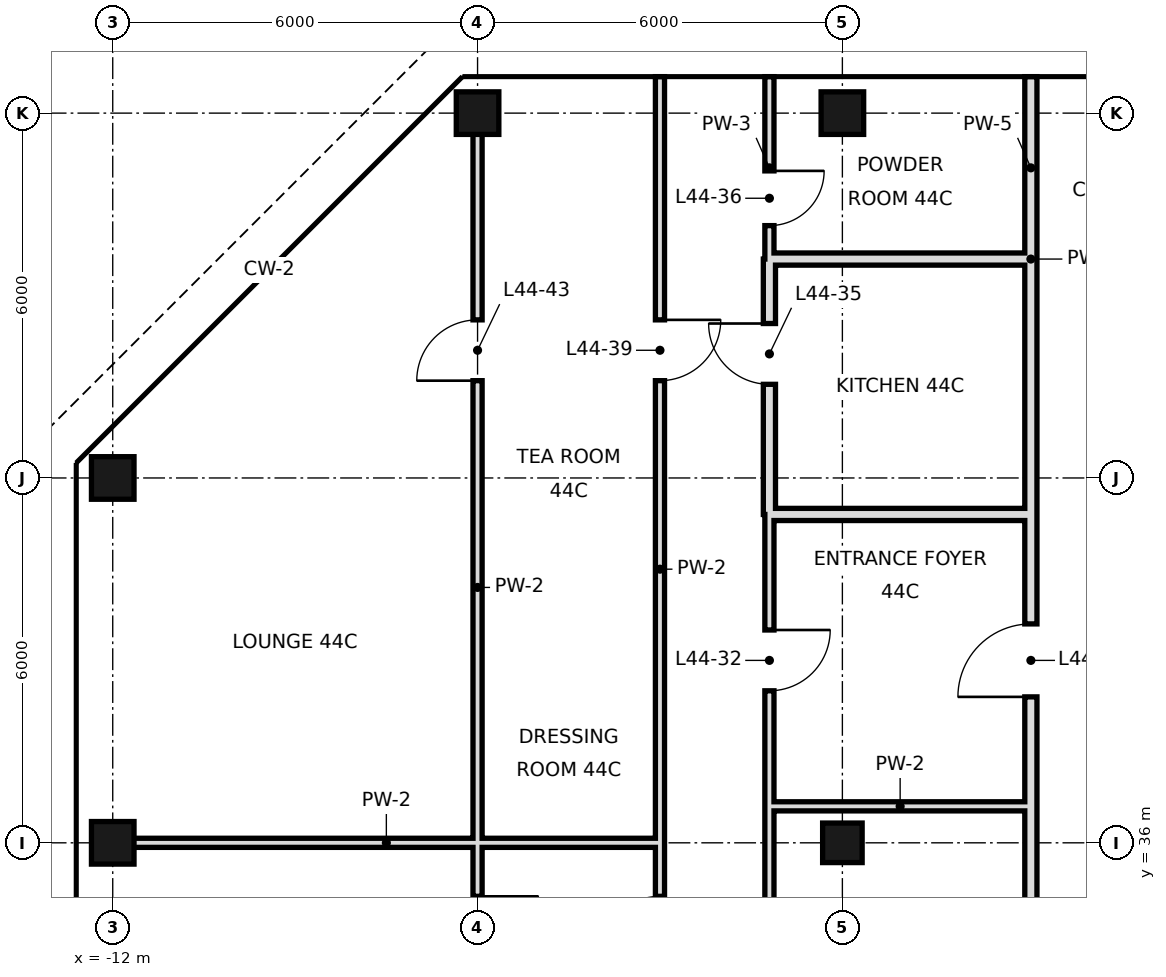
"""IFC4 building model, lengths in metres.
Left out: names, types, materials, properties, quantities, classifications, styles, units other than length and angle.
Written with IfcOpenShell. Run it as: python <this file> out.ifc"""

import sys

from ifc_helpers import new_model, si_unit, direction, frame, frame_2d, origin, origin_2d, place, context, subcontext, project, spatial, rectangle, hollow_rectangle, extrude, element, fill, save


model = new_model("IFC4")
c1 = context("Model", 3, precision=1e-05, world=origin(), true_north=direction((0.0, 1.0)))
c2 = subcontext(c1, "Body", "Model", "MODEL_VIEW")
j1 = project(units=[si_unit("LENGTHUNIT", "METRE"), si_unit("PLANEANGLEUNIT", "RADIAN")], contexts=[c1])
p1 = place(None, origin())
s1 = spatial("IfcSite", under=j1, at=p1, CompositionType="ELEMENT")
p2 = place(p1, origin())
s2 = spatial("IfcBuilding", under=s1, at=p2, CompositionType="ELEMENT")
p3 = place(p2, frame((0.0, 0.0, 192.0)))
s3 = spatial("IfcBuildingStorey", under=s2, at=p3, CompositionType="ELEMENT", Elevation=192.0)
for number, where, z_axis, x_axis in (
    (1, (-12.0, 36.0, -0.3), (0.0, 0.0, 1.0), (1.0, 0.0, 0.0)),
    (2, (-12.0, 42.0, -0.3), (0.0, 0.0, 1.0), (1.0, 0.0, 0.0)),
    (3, (-6.0, 48.0, -0.3), (0.0, 0.0, 1.0), (1.0, 0.0, 0.0)),
):
    element("IfcColumn", number, at=place(p3, frame(where, z_axis=z_axis, x_axis=x_axis)), inside=s3, PredefinedType="COLUMN", context=c2, shape_type="SweptSolid", body=[
        extrude(hollow_rectangle(XDim=0.7, YDim=0.7, WallThickness=0.036, at=origin_2d()), origin(), (0.0, 0.0, 1.0), 3.9),
    ])
p4 = place(p3, frame((0.0, 36.0, 0.0), z_axis=(0.0, 0.0, 1.0), x_axis=(1.0, 0.0, 0.0)))
e4 = element("IfcColumn", 4, at=p4, inside=s3, PredefinedType="COLUMN", context=c2, shape_type="SweptSolid", body=[
    extrude(hollow_rectangle(XDim=0.65, YDim=0.65, WallThickness=0.032, at=origin_2d()), origin(), (0.0, 0.0, 1.0), 3.6),
])
p5 = place(p3, frame((0.0, 48.0, 0.0), z_axis=(0.0, 0.0, 1.0), x_axis=(1.0, 0.0, 0.0)))
e5 = element("IfcColumn", 5, at=p5, inside=s3, PredefinedType="COLUMN", context=c2, shape_type="SweptSolid", body=[
    extrude(hollow_rectangle(XDim=0.7, YDim=0.7, WallThickness=0.036, at=origin_2d()), origin(), (0.0, 0.0, 1.0), 3.6),
])
p6 = place(p3, frame((-1.2, 41.4, 0.0), z_axis=(0.0, 0.0, 1.0), x_axis=(0.0, 1.0, 0.0)))
e6 = element("IfcWall", 6, at=p6, inside=s3, PredefinedType="SOLIDWALL", context=c2, shape_type="SweptSolid", body=[
    extrude(rectangle(XDim=4.2, YDim=0.2, at=frame_2d((2.1, 0.0))), origin(), (0.0, 0.0, 1.0), 2.72),
])
p7 = place(p6, frame((2.14, 0.0, 0.0)))
e7 = element("IfcOpeningElement", 7, at=p7, cuts=e6, PredefinedType="OPENING", context=c2, shape_type="SweptSolid", body=[
    extrude(rectangle(XDim=1.0, YDim=2.4, at=frame_2d((0.5, 1.2))), frame((0.0, 0.11, 0.0), z_axis=(0.0, -1.0, 0.0), x_axis=(1.0, 0.0, 0.0)), (0.0, 0.0, 1.0), 0.22),
])
p8 = place(p3, frame((-1.2, 18.0, 0.0), z_axis=(0.0, 0.0, 1.0), x_axis=(0.0, 1.0, 0.0)))
e8 = element("IfcWall", 8, at=p8, inside=s3, PredefinedType="PARTITIONING", context=c2, shape_type="SweptSolid", body=[
    extrude(rectangle(XDim=23.4, YDim=0.15, at=frame_2d((11.7, 0.0))), origin(), (0.0, 0.0, 1.0), 3.42),
])
p9 = place(p8, frame((20.5, 0.0, 0.0)))
e9 = element("IfcOpeningElement", 9, at=p9, cuts=e8, PredefinedType="OPENING", context=c2, shape_type="SweptSolid", body=[
    extrude(rectangle(XDim=1.0, YDim=2.4, at=frame_2d((0.5, 1.2))), frame((0.0, 0.085, 0.0), z_axis=(0.0, -1.0, 0.0), x_axis=(1.0, 0.0, 0.0)), (0.0, 0.0, 1.0), 0.17),
])
p10 = place(p8, frame((4.3, 0.0, 0.0)))
e10 = element("IfcOpeningElement", 10, at=p10, cuts=e8, PredefinedType="OPENING", context=c2, shape_type="SweptSolid", body=[
    extrude(rectangle(XDim=1.0, YDim=2.4, at=frame_2d((0.5, 1.2))), frame((0.0, 0.085, 0.0), z_axis=(0.0, -1.0, 0.0), x_axis=(1.0, 0.0, 0.0)), (0.0, 0.0, 1.0), 0.17),
])
p11 = place(p8, frame((15.1, 0.0, 0.0)))
e11 = element("IfcOpeningElement", 11, at=p11, cuts=e8, PredefinedType="OPENING", context=c2, shape_type="SweptSolid", body=[
    extrude(rectangle(XDim=1.0, YDim=2.4, at=frame_2d((0.5, 1.2))), frame((0.0, 0.085, 0.0), z_axis=(0.0, -1.0, 0.0), x_axis=(1.0, 0.0, 0.0)), (0.0, 0.0, 1.0), 0.17),
])
p12 = place(p3, frame((-1.2, 45.6, 0.0), z_axis=(0.0, 0.0, 1.0), x_axis=(0.0, 1.0, 0.0)))
e12 = element("IfcWall", 12, at=p12, inside=s3, PredefinedType="PARTITIONING", context=c2, shape_type="SweptSolid", body=[
    extrude(rectangle(XDim=3.0, YDim=0.15, at=frame_2d((1.5, 0.0))), origin(), (0.0, 0.0, 1.0), 3.42),
])
p13 = place(p12, frame((0.55, 0.0, 0.0)))
e13 = element("IfcOpeningElement", 13, at=p13, cuts=e12, PredefinedType="OPENING", context=c2, shape_type="SweptSolid", body=[
    extrude(rectangle(XDim=0.9, YDim=2.4, at=frame_2d((0.45, 1.2))), frame((0.0, 0.085, 0.0), z_axis=(0.0, -1.0, 0.0), x_axis=(1.0, 0.0, 0.0)), (0.0, 0.0, 1.0), 0.17),
])
p14 = place(p3, frame((-3.0, 32.4, 0.0), z_axis=(0.0, 0.0, 1.0), x_axis=(0.0, 1.0, 0.0)))
e14 = element("IfcWall", 14, at=p14, inside=s3, PredefinedType="PARTITIONING", context=c2, shape_type="SweptSolid", body=[
    extrude(rectangle(XDim=16.2, YDim=0.15, at=frame_2d((8.1, 0.0))), origin(), (0.0, 0.0, 1.0), 3.42),
])
p15 = place(p14, frame((1.72, 0.0, 0.0)))
e15 = element("IfcOpeningElement", 15, at=p15, cuts=e14, PredefinedType="OPENING", context=c2, shape_type="SweptSolid", body=[
    extrude(rectangle(XDim=1.0, YDim=2.4, at=frame_2d((0.5, 1.2))), frame((0.0, 0.085, 0.0), z_axis=(0.0, -1.0, 0.0), x_axis=(1.0, 0.0, 0.0)), (0.0, 0.0, 1.0), 0.17),
])
p16 = place(p14, frame((11.2, 0.0, 0.0)))
e16 = element("IfcOpeningElement", 16, at=p16, cuts=e14, PredefinedType="OPENING", context=c2, shape_type="SweptSolid", body=[
    extrude(rectangle(XDim=1.0, YDim=2.4, at=frame_2d((0.5, 1.2))), frame((0.0, 0.085, 0.0), z_axis=(0.0, -1.0, 0.0), x_axis=(1.0, 0.0, 0.0)), (0.0, 0.0, 1.0), 0.17),
])
p17 = place(p3, frame((-6.0, 32.4, 0.0), z_axis=(0.0, 0.0, 1.0), x_axis=(0.0, 1.0, 0.0)))
e17 = element("IfcWall", 17, at=p17, inside=s3, PredefinedType="PARTITIONING", context=c2, shape_type="SweptSolid", body=[
    extrude(rectangle(XDim=15.6, YDim=0.15, at=frame_2d((7.8, 0.0))), origin(), (0.0, 0.0, 1.0), 3.42),
])
p18 = place(p17, frame((1.72, 0.0, 0.0)))
e18 = element("IfcOpeningElement", 18, at=p18, cuts=e17, PredefinedType="OPENING", context=c2, shape_type="SweptSolid", body=[
    extrude(rectangle(XDim=1.0, YDim=2.4, at=frame_2d((0.5, 1.2))), frame((0.0, 0.085, 0.0), z_axis=(0.0, -1.0, 0.0), x_axis=(1.0, 0.0, 0.0)), (0.0, 0.0, 1.0), 0.17),
])
p19 = place(p17, frame((11.2, 0.0, 0.0)))
e19 = element("IfcOpeningElement", 19, at=p19, cuts=e17, PredefinedType="OPENING", context=c2, shape_type="SweptSolid", body=[
    extrude(rectangle(XDim=1.0, YDim=2.4, at=frame_2d((0.5, 1.2))), frame((0.0, 0.085, 0.0), z_axis=(0.0, -1.0, 0.0), x_axis=(1.0, 0.0, 0.0)), (0.0, 0.0, 1.0), 0.17),
])
p20 = place(p3, frame((3.1, 18.0, 0.0), z_axis=(0.0, 0.0, 1.0), x_axis=(0.0, 1.0, 0.0)))
e20 = element("IfcWall", 20, at=p20, inside=s3, PredefinedType="SOLIDWALL", context=c2, shape_type="SweptSolid", body=[
    extrude(rectangle(XDim=23.4, YDim=0.2, at=frame_2d((11.7, 0.0))), origin(), (0.0, 0.0, 1.0), 2.97),
])
p21 = place(p20, frame((20.4, 0.0, 0.0)))
e21 = element("IfcOpeningElement", 21, at=p21, cuts=e20, PredefinedType="OPENING", context=c2, shape_type="SweptSolid", body=[
    extrude(rectangle(XDim=1.2, YDim=2.4, at=frame_2d((0.6, 1.2))), frame((0.0, 0.11, 0.0), z_axis=(0.0, -1.0, 0.0), x_axis=(1.0, 0.0, 0.0)), (0.0, 0.0, 1.0), 0.22),
])
p22 = place(p3, frame((3.1, 45.6, 0.0), z_axis=(0.0, 0.0, 1.0), x_axis=(0.0, 1.0, 0.0)))
e22 = element("IfcWall", 22, at=p22, inside=s3, PredefinedType="SOLIDWALL", context=c2, shape_type="SweptSolid", body=[
    extrude(rectangle(XDim=3.0, YDim=0.2, at=frame_2d((1.5, 0.0))), origin(), (0.0, 0.0, 1.0), 2.72),
])
p23 = place(p3, frame((3.1, 41.4, 0.0), z_axis=(0.0, 0.0, 1.0), x_axis=(0.0, 1.0, 0.0)))
e23 = element("IfcWall", 23, at=p23, inside=s3, PredefinedType="SOLIDWALL", context=c2, shape_type="SweptSolid", body=[
    extrude(rectangle(XDim=4.2, YDim=0.2, at=frame_2d((2.1, 0.0))), origin(), (0.0, 0.0, 1.0), 2.97),
])
p24 = place(p3, frame((-12.0, 36.0, 0.0), z_axis=(0.0, 0.0, 1.0), x_axis=(1.0, 0.0, 0.0)))
e24 = element("IfcWall", 24, at=p24, inside=s3, PredefinedType="PARTITIONING", context=c2, shape_type="SweptSolid", body=[
    extrude(rectangle(XDim=9.0, YDim=0.15, at=frame_2d((4.5, 0.0))), origin(), (0.0, 0.0, 1.0), 2.72),
])
p25 = place(p3, frame((-1.2, 36.6, 0.0), z_axis=(0.0, 0.0, 1.0), x_axis=(1.0, 0.0, 0.0)))
e25 = element("IfcWall", 25, at=p25, inside=s3, PredefinedType="PARTITIONING", context=c2, shape_type="SweptSolid", body=[
    extrude(rectangle(XDim=4.3, YDim=0.15, at=frame_2d((2.15, 0.0))), origin(), (0.0, 0.0, 1.0), 3.42),
])
for number, where, z_axis, x_axis in (
    (26, (-1.2, 41.4, 0.0), (0.0, 0.0, 1.0), (1.0, 0.0, 0.0)),
    (27, (-1.2, 45.6, 0.0), (0.0, 0.0, 1.0), (1.0, 0.0, 0.0)),
):
    element("IfcWall", number, at=place(p3, frame(where, z_axis=z_axis, x_axis=x_axis)), inside=s3, PredefinedType="SOLIDWALL", context=c2, shape_type="SweptSolid", body=[
        extrude(rectangle(XDim=4.3, YDim=0.2, at=frame_2d((2.15, 0.0))), origin(), (0.0, 0.0, 1.0), 2.72),
    ])
p26 = place(p9, origin())
e28 = element("IfcDoor", 28, at=p26, inside=s3, OperationType="SINGLE_SWING_RIGHT", PredefinedType="DOOR", context=c2, shape_type="SweptSolid", body=[
    extrude(rectangle(XDim=1.0, YDim=2.4, at=frame_2d((0.5, 1.2))), frame((0.0, 0.025, 0.0), z_axis=(0.0, -1.0, 0.0), x_axis=(1.0, 0.0, 0.0)), (0.0, 0.0, 1.0), 0.05),
])
fill(e9, e28)
p27 = place(p7, frame((1.0, 0.0, 0.0), z_axis=(0.0, 0.0, 1.0), x_axis=(-1.0, 0.0, 0.0)))
e29 = element("IfcDoor", 29, at=p27, inside=s3, OperationType="SINGLE_SWING_LEFT", PredefinedType="DOOR", context=c2, shape_type="SweptSolid", body=[
    extrude(rectangle(XDim=1.0, YDim=2.4, at=frame_2d((0.5, 1.2))), frame((0.0, 0.025, 0.0), z_axis=(0.0, -1.0, 0.0), x_axis=(1.0, 0.0, 0.0)), (0.0, 0.0, 1.0), 0.05),
])
fill(e7, e29)
p28 = place(p13, origin())
e30 = element("IfcDoor", 30, at=p28, inside=s3, OperationType="SINGLE_SWING_RIGHT", PredefinedType="DOOR", context=c2, shape_type="SweptSolid", body=[
    extrude(rectangle(XDim=0.9, YDim=2.4, at=frame_2d((0.45, 1.2))), frame((0.0, 0.025, 0.0), z_axis=(0.0, -1.0, 0.0), x_axis=(1.0, 0.0, 0.0)), (0.0, 0.0, 1.0), 0.05),
])
fill(e13, e30)
p29 = place(p15, origin())
e31 = element("IfcDoor", 31, at=p29, inside=s3, OperationType="SINGLE_SWING_LEFT", PredefinedType="DOOR", context=c2, shape_type="SweptSolid", body=[
    extrude(rectangle(XDim=1.0, YDim=2.4, at=frame_2d((0.5, 1.2))), frame((0.0, 0.025, 0.0), z_axis=(0.0, -1.0, 0.0), x_axis=(1.0, 0.0, 0.0)), (0.0, 0.0, 1.0), 0.05),
])
fill(e15, e31)
p30 = place(p16, origin())
e32 = element("IfcDoor", 32, at=p30, inside=s3, OperationType="SINGLE_SWING_RIGHT", PredefinedType="DOOR", context=c2, shape_type="SweptSolid", body=[
    extrude(rectangle(XDim=1.0, YDim=2.4, at=frame_2d((0.5, 1.2))), frame((0.0, 0.025, 0.0), z_axis=(0.0, -1.0, 0.0), x_axis=(1.0, 0.0, 0.0)), (0.0, 0.0, 1.0), 0.05),
])
fill(e16, e32)
p31 = place(p18, origin())
e33 = element("IfcDoor", 33, at=p31, inside=s3, OperationType="SINGLE_SWING_RIGHT", PredefinedType="DOOR", context=c2, shape_type="SweptSolid", body=[
    extrude(rectangle(XDim=1.0, YDim=2.4, at=frame_2d((0.5, 1.2))), frame((0.0, 0.025, 0.0), z_axis=(0.0, -1.0, 0.0), x_axis=(1.0, 0.0, 0.0)), (0.0, 0.0, 1.0), 0.05),
])
fill(e18, e33)
p32 = place(p19, origin())
e34 = element("IfcDoor", 34, at=p32, inside=s3, OperationType="SINGLE_SWING_LEFT", PredefinedType="DOOR", context=c2, shape_type="SweptSolid", body=[
    extrude(rectangle(XDim=1.0, YDim=2.4, at=frame_2d((0.5, 1.2))), frame((0.0, 0.025, 0.0), z_axis=(0.0, -1.0, 0.0), x_axis=(1.0, 0.0, 0.0)), (0.0, 0.0, 1.0), 0.05),
])
fill(e19, e34)
p33 = place(p21, origin())
e35 = element("IfcDoor", 35, at=p33, inside=s3, OperationType="SINGLE_SWING_LEFT", PredefinedType="DOOR", context=c2, shape_type="SweptSolid", body=[
    extrude(rectangle(XDim=1.2, YDim=2.4, at=frame_2d((0.6, 1.2))), frame((0.0, 0.025, 0.0), z_axis=(0.0, -1.0, 0.0), x_axis=(1.0, 0.0, 0.0)), (0.0, 0.0, 1.0), 0.05),
])
fill(e21, e35)
save(model, sys.argv[1])
